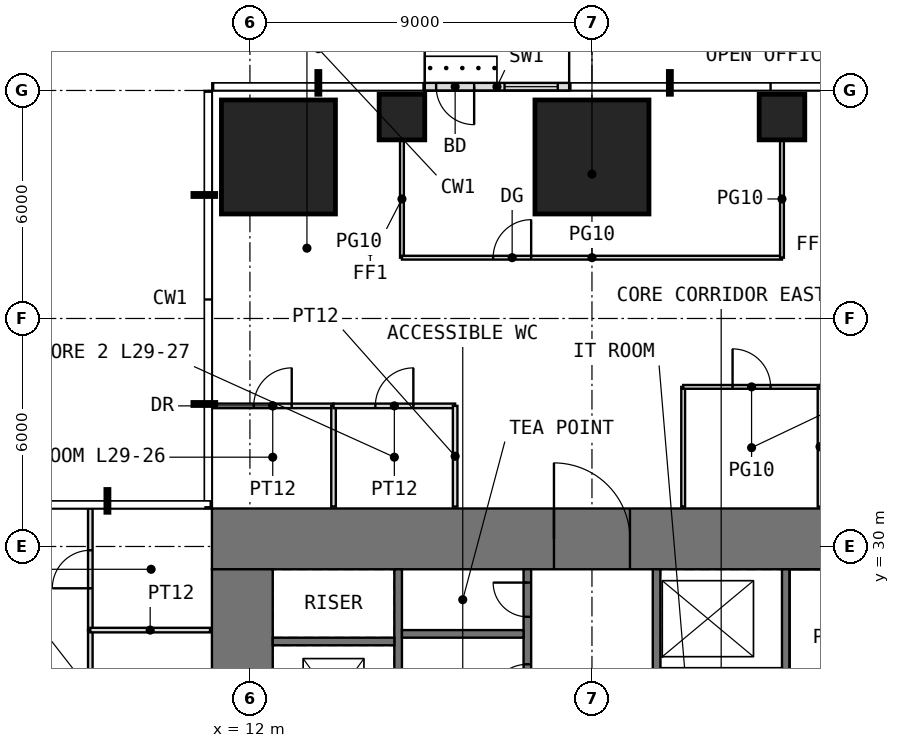
"""IFC4 building model, lengths in metres.
Left out: names, types, materials, properties, quantities, classifications, styles, units other than length and angle.
Written with IfcOpenShell. Run it as: python <this file> out.ifc"""

import sys

from ifc_helpers import new_model, si_unit, direction, frame, frame_2d, origin, origin_2d, place, context, subcontext, project, spatial, rectangle, extrude, element, fill, save


model = new_model("IFC4")
c1 = context("Model", 3, precision=1e-05, world=origin(), true_north=direction((0.0, 1.0)))
c2 = subcontext(c1, "Body", "Model", "MODEL_VIEW")
j1 = project(units=[si_unit("LENGTHUNIT", "METRE"), si_unit("PLANEANGLEUNIT", "RADIAN")], contexts=[c1])
p1 = place(None, origin())
s1 = spatial("IfcSite", under=j1, at=p1, CompositionType="ELEMENT")
p2 = place(p1, origin())
s2 = spatial("IfcBuilding", under=s1, at=p2, CompositionType="ELEMENT")
p3 = place(p2, frame((0.0, 0.0, 124.5)))
s3 = spatial("IfcBuildingStorey", under=s2, at=p3, CompositionType="ELEMENT", Elevation=124.5)
p4 = place(p3, frame((12.75, 40.25, 0.0), z_axis=(0.0, 0.0, 1.0), x_axis=(1.0, 0.0, 0.0)))
e1 = element("IfcColumn", 1, at=p4, inside=s3, PredefinedType="COLUMN", context=c2, shape_type="SweptSolid", body=[
    extrude(rectangle(XDim=3.0, YDim=3.0, at=origin_2d()), origin(), (0.0, 0.0, 1.0), 4.0),
])
p5 = place(p3, frame((16.0, 41.3, 0.0), z_axis=(0.0, 0.0, 1.0), x_axis=(1.0, 0.0, 0.0)))
e2 = element("IfcColumn", 2, at=p5, inside=s3, PredefinedType="COLUMN", context=c2, shape_type="SweptSolid", body=[
    extrude(rectangle(XDim=1.2, YDim=1.2, at=origin_2d()), origin(), (0.0, 0.0, 1.0), 4.0),
])
p6 = place(p3, frame((21.0, 40.25, 0.0), z_axis=(0.0, 0.0, 1.0), x_axis=(1.0, 0.0, 0.0)))
e3 = element("IfcColumn", 3, at=p6, inside=s3, PredefinedType="COLUMN", context=c2, shape_type="SweptSolid", body=[
    extrude(rectangle(XDim=3.0, YDim=3.0, at=origin_2d()), origin(), (0.0, 0.0, 1.0), 4.0),
])
p7 = place(p3, frame((26.0, 41.3, 0.0), z_axis=(0.0, 0.0, 1.0), x_axis=(1.0, 0.0, 0.0)))
e4 = element("IfcColumn", 4, at=p7, inside=s3, PredefinedType="COLUMN", context=c2, shape_type="SweptSolid", body=[
    extrude(rectangle(XDim=1.2, YDim=1.2, at=origin_2d()), origin(), (0.0, 0.0, 1.0), 4.0),
])
p8 = place(p3, frame((20.4, 42.1, 0.0), z_axis=(0.0, 0.0, 1.0), x_axis=(-1.0, 0.0, 0.0)))
e5 = element("IfcWall", 5, at=p8, inside=s3, PredefinedType="USERDEFINED", context=c2, shape_type="SweptSolid", body=[
    extrude(rectangle(XDim=3.8, YDim=0.2, at=frame_2d((1.9, 0.0))), origin(), (0.0, 0.0, 1.0), 3.75),
])
p9 = place(p8, frame((2.5, 0.0, 0.0)))
e6 = element("IfcOpeningElement", 6, at=p9, cuts=e5, PredefinedType="OPENING", context=c2, shape_type="SweptSolid", body=[
    extrude(rectangle(XDim=1.0, YDim=2.4, at=frame_2d((0.5, 1.2))), frame((0.0, 0.11, 0.0), z_axis=(0.0, -1.0, 0.0), x_axis=(1.0, 0.0, 0.0)), (0.0, 0.0, 1.0), 0.22),
])
p10 = place(p8, frame((0.3, 0.0, 0.3)))
e7 = element("IfcOpeningElement", 7, at=p10, cuts=e5, PredefinedType="OPENING", context=c2, shape_type="SweptSolid", body=[
    extrude(rectangle(XDim=1.4, YDim=2.7, at=frame_2d((0.7, 1.35))), frame((0.0, 0.11, 0.0), z_axis=(0.0, -1.0, 0.0), x_axis=(1.0, 0.0, 0.0)), (0.0, 0.0, 1.0), 0.22),
])
p11 = place(p3, frame((11.0, 30.2, -0.05), z_axis=(0.0, 0.0, 1.0), x_axis=(1.0, 0.0, 0.0)))
e8 = element("IfcWall", 8, at=p11, inside=s3, PredefinedType="SHEAR", context=c2, shape_type="SweptSolid", body=[
    extrude(rectangle(XDim=20.0, YDim=1.6, at=frame_2d((10.0, 0.0))), origin(), (0.0, 0.0, 1.0), 4.0),
])
p12 = place(p11, frame((9.0, 0.0, 0.05)))
e9 = element("IfcOpeningElement", 9, at=p12, cuts=e8, PredefinedType="OPENING", context=c2, shape_type="SweptSolid", body=[
    extrude(rectangle(XDim=2.0, YDim=2.2, at=frame_2d((1.0, 1.1))), frame((0.0, 0.81, 0.0), z_axis=(0.0, -1.0, 0.0), x_axis=(1.0, 0.0, 0.0)), (0.0, 0.0, 1.0), 1.62),
])
p13 = place(p3, frame((11.8, 12.6, -0.05), z_axis=(0.0, 0.0, 1.0), x_axis=(0.0, 1.0, 0.0)))
e10 = element("IfcWall", 10, at=p13, inside=s3, PredefinedType="SHEAR", context=c2, shape_type="SweptSolid", body=[
    extrude(rectangle(XDim=16.8, YDim=1.6, at=frame_2d((8.4, 0.0))), origin(), (0.0, 0.0, 1.0), 4.0),
])
p14 = place(p13, frame((9.9, 0.0, 0.05)))
e11 = element("IfcOpeningElement", 11, at=p14, cuts=e10, PredefinedType="OPENING", context=c2, shape_type="SweptSolid", body=[
    extrude(rectangle(XDim=1.0, YDim=2.2, at=frame_2d((0.5, 1.1))), frame((0.0, 0.81, 0.0), z_axis=(0.0, -1.0, 0.0), x_axis=(1.0, 0.0, 0.0)), (0.0, 0.0, 1.0), 1.62),
])
p15 = place(p3, frame((15.9, 12.6, -0.05), z_axis=(0.0, 0.0, 1.0), x_axis=(0.0, 1.0, 0.0)))
e12 = element("IfcWall", 12, at=p15, inside=s3, PredefinedType="SHEAR", context=c2, shape_type="SweptSolid", body=[
    extrude(rectangle(XDim=16.8, YDim=0.2, at=frame_2d((8.4, 0.0))), origin(), (0.0, 0.0, 1.0), 4.0),
])
p16 = place(p15, frame((8.9, 0.0, 0.05)))
e13 = element("IfcOpeningElement", 13, at=p16, cuts=e12, PredefinedType="OPENING", context=c2, shape_type="SweptSolid", body=[
    extrude(rectangle(XDim=1.0, YDim=2.2, at=frame_2d((0.5, 1.1))), frame((0.0, 0.11, 0.0), z_axis=(0.0, -1.0, 0.0), x_axis=(1.0, 0.0, 0.0)), (0.0, 0.0, 1.0), 0.22),
])
p17 = place(p3, frame((19.3, 12.6, -0.05), z_axis=(0.0, 0.0, 1.0), x_axis=(0.0, 1.0, 0.0)))
e14 = element("IfcWall", 14, at=p17, inside=s3, PredefinedType="SHEAR", context=c2, shape_type="SweptSolid", body=[
    extrude(rectangle(XDim=16.8, YDim=0.2, at=frame_2d((8.4, 0.0))), origin(), (0.0, 0.0, 1.0), 4.0),
])
p18 = place(p17, frame((8.7, 0.0, 0.05)))
e15 = element("IfcOpeningElement", 15, at=p18, cuts=e14, PredefinedType="OPENING", context=c2, shape_type="SweptSolid", body=[
    extrude(rectangle(XDim=1.0, YDim=2.2, at=frame_2d((0.5, 1.1))), frame((0.0, 0.11, 0.0), z_axis=(0.0, -1.0, 0.0), x_axis=(1.0, 0.0, 0.0)), (0.0, 0.0, 1.0), 0.22),
])
p19 = place(p17, frame((10.85, 0.0, 0.05)))
e16 = element("IfcOpeningElement", 16, at=p19, cuts=e14, PredefinedType="OPENING", context=c2, shape_type="SweptSolid", body=[
    extrude(rectangle(XDim=0.9, YDim=2.2, at=frame_2d((0.45, 1.1))), frame((0.0, 0.11, 0.0), z_axis=(0.0, -1.0, 0.0), x_axis=(1.0, 0.0, 0.0)), (0.0, 0.0, 1.0), 0.22),
])
p20 = place(p17, frame((13.3, 0.0, 0.05)))
e17 = element("IfcOpeningElement", 17, at=p20, cuts=e14, PredefinedType="OPENING", context=c2, shape_type="SweptSolid", body=[
    extrude(rectangle(XDim=1.0, YDim=2.2, at=frame_2d((0.5, 1.1))), frame((0.0, 0.11, 0.0), z_axis=(0.0, -1.0, 0.0), x_axis=(1.0, 0.0, 0.0)), (0.0, 0.0, 1.0), 0.22),
])
p21 = place(p17, frame((15.55, 0.0, 0.05)))
e18 = element("IfcOpeningElement", 18, at=p21, cuts=e14, PredefinedType="OPENING", context=c2, shape_type="SweptSolid", body=[
    extrude(rectangle(XDim=0.9, YDim=2.2, at=frame_2d((0.45, 1.1))), frame((0.0, 0.11, 0.0), z_axis=(0.0, -1.0, 0.0), x_axis=(1.0, 0.0, 0.0)), (0.0, 0.0, 1.0), 0.22),
])
p22 = place(p17, frame((0.75, 0.0, 0.05)))
e19 = element("IfcOpeningElement", 19, at=p22, cuts=e14, PredefinedType="OPENING", context=c2, shape_type="SweptSolid", body=[
    extrude(rectangle(XDim=1.1, YDim=2.2, at=frame_2d((0.55, 1.1))), frame((0.0, 0.11, 0.0), z_axis=(0.0, -1.0, 0.0), x_axis=(1.0, 0.0, 0.0)), (0.0, 0.0, 1.0), 0.22),
])
p23 = place(p17, frame((3.55, 0.0, 0.05)))
e20 = element("IfcOpeningElement", 20, at=p23, cuts=e14, PredefinedType="OPENING", context=c2, shape_type="SweptSolid", body=[
    extrude(rectangle(XDim=1.1, YDim=2.2, at=frame_2d((0.55, 1.1))), frame((0.0, 0.11, 0.0), z_axis=(0.0, -1.0, 0.0), x_axis=(1.0, 0.0, 0.0)), (0.0, 0.0, 1.0), 0.22),
])
p24 = place(p17, frame((6.35, 0.0, 0.05)))
e21 = element("IfcOpeningElement", 21, at=p24, cuts=e14, PredefinedType="OPENING", context=c2, shape_type="SweptSolid", body=[
    extrude(rectangle(XDim=1.1, YDim=2.2, at=frame_2d((0.55, 1.1))), frame((0.0, 0.11, 0.0), z_axis=(0.0, -1.0, 0.0), x_axis=(1.0, 0.0, 0.0)), (0.0, 0.0, 1.0), 0.22),
])
p25 = place(p3, frame((22.7, 12.6, -0.05), z_axis=(0.0, 0.0, 1.0), x_axis=(0.0, 1.0, 0.0)))
e22 = element("IfcWall", 22, at=p25, inside=s3, PredefinedType="SHEAR", context=c2, shape_type="SweptSolid", body=[
    extrude(rectangle(XDim=16.8, YDim=0.2, at=frame_2d((8.4, 0.0))), origin(), (0.0, 0.0, 1.0), 4.0),
])
p26 = place(p25, frame((0.45, 0.0, 0.05)))
e23 = element("IfcOpeningElement", 23, at=p26, cuts=e22, PredefinedType="OPENING", context=c2, shape_type="SweptSolid", body=[
    extrude(rectangle(XDim=0.9, YDim=2.2, at=frame_2d((0.45, 1.1))), frame((0.0, 0.11, 0.0), z_axis=(0.0, -1.0, 0.0), x_axis=(1.0, 0.0, 0.0)), (0.0, 0.0, 1.0), 0.22),
])
p27 = place(p25, frame((7.1, 0.0, 0.05)))
e24 = element("IfcOpeningElement", 24, at=p27, cuts=e22, PredefinedType="OPENING", context=c2, shape_type="SweptSolid", body=[
    extrude(rectangle(XDim=1.0, YDim=2.2, at=frame_2d((0.5, 1.1))), frame((0.0, 0.11, 0.0), z_axis=(0.0, -1.0, 0.0), x_axis=(1.0, 0.0, 0.0)), (0.0, 0.0, 1.0), 0.22),
])
p28 = place(p25, frame((1.95, 0.0, 0.05)))
e25 = element("IfcOpeningElement", 25, at=p28, cuts=e22, PredefinedType="OPENING", context=c2, shape_type="SweptSolid", body=[
    extrude(rectangle(XDim=0.9, YDim=2.2, at=frame_2d((0.45, 1.1))), frame((0.0, 0.11, 0.0), z_axis=(0.0, -1.0, 0.0), x_axis=(1.0, 0.0, 0.0)), (0.0, 0.0, 1.0), 0.22),
])
p29 = place(p25, frame((4.95, 0.0, 0.05)))
e26 = element("IfcOpeningElement", 26, at=p29, cuts=e22, PredefinedType="OPENING", context=c2, shape_type="SweptSolid", body=[
    extrude(rectangle(XDim=0.9, YDim=2.2, at=frame_2d((0.45, 1.1))), frame((0.0, 0.11, 0.0), z_axis=(0.0, -1.0, 0.0), x_axis=(1.0, 0.0, 0.0)), (0.0, 0.0, 1.0), 0.22),
])
p30 = place(p25, frame((9.4, 0.0, 0.05)))
e27 = element("IfcOpeningElement", 27, at=p30, cuts=e22, PredefinedType="OPENING", context=c2, shape_type="SweptSolid", body=[
    extrude(rectangle(XDim=1.0, YDim=2.2, at=frame_2d((0.5, 1.1))), frame((0.0, 0.11, 0.0), z_axis=(0.0, -1.0, 0.0), x_axis=(1.0, 0.0, 0.0)), (0.0, 0.0, 1.0), 0.22),
])
p31 = place(p3, frame((26.1, 12.6, -0.05), z_axis=(0.0, 0.0, 1.0), x_axis=(0.0, 1.0, 0.0)))
e28 = element("IfcWall", 28, at=p31, inside=s3, PredefinedType="SHEAR", context=c2, shape_type="SweptSolid", body=[
    extrude(rectangle(XDim=16.8, YDim=0.2, at=frame_2d((8.4, 0.0))), origin(), (0.0, 0.0, 1.0), 4.0),
])
p32 = place(p31, frame((6.9, 0.0, 0.05)))
e29 = element("IfcOpeningElement", 29, at=p32, cuts=e28, PredefinedType="OPENING", context=c2, shape_type="SweptSolid", body=[
    extrude(rectangle(XDim=1.0, YDim=2.2, at=frame_2d((0.5, 1.1))), frame((0.0, 0.11, 0.0), z_axis=(0.0, -1.0, 0.0), x_axis=(1.0, 0.0, 0.0)), (0.0, 0.0, 1.0), 0.22),
])
for number, where, z_axis, x_axis in (
    (30, (12.6, 27.5, -0.05), (0.0, 0.0, 1.0), (1.0, 0.0, 0.0)),
    (31, (16.0, 27.7, -0.05), (0.0, 0.0, 1.0), (1.0, 0.0, 0.0)),
):
    element("IfcWall", number, at=place(p3, frame(where, z_axis=z_axis, x_axis=x_axis)), inside=s3, PredefinedType="SHEAR", context=c2, shape_type="SweptSolid", body=[
        extrude(rectangle(XDim=3.2, YDim=0.2, at=frame_2d((1.6, 0.0))), origin(), (0.0, 0.0, 1.0), 4.0),
    ])
p33 = place(p3, frame((7.8, 24.6, 0.0), z_axis=(0.0, 0.0, 1.0), x_axis=(0.0, 1.0, 0.0)))
e32 = element("IfcWall", 32, at=p33, inside=s3, PredefinedType="PARTITIONING", context=c2, shape_type="SweptSolid", body=[
    extrude(rectangle(XDim=3.2, YDim=0.12, at=frame_2d((1.6, 0.0))), origin(), (0.0, 0.0, 1.0), 3.75),
])
p34 = place(p33, frame((1.1, 0.0, 0.0)))
e33 = element("IfcOpeningElement", 33, at=p34, cuts=e32, PredefinedType="OPENING", context=c2, shape_type="SweptSolid", body=[
    extrude(rectangle(XDim=1.0, YDim=2.2, at=frame_2d((0.5, 1.1))), frame((0.0, 0.07, 0.0), z_axis=(0.0, -1.0, 0.0), x_axis=(1.0, 0.0, 0.0)), (0.0, 0.0, 1.0), 0.14),
])
p35 = place(p3, frame((7.8, 27.8, 0.0), z_axis=(0.0, 0.0, 1.0), x_axis=(0.0, 1.0, 0.0)))
e34 = element("IfcWall", 34, at=p35, inside=s3, PredefinedType="PARTITIONING", context=c2, shape_type="SweptSolid", body=[
    extrude(rectangle(XDim=3.2, YDim=0.12, at=frame_2d((1.6, 0.0))), origin(), (0.0, 0.0, 1.0), 3.75),
])
p36 = place(p35, frame((1.1, 0.0, 0.0)))
e35 = element("IfcOpeningElement", 35, at=p36, cuts=e34, PredefinedType="OPENING", context=c2, shape_type="SweptSolid", body=[
    extrude(rectangle(XDim=1.0, YDim=2.2, at=frame_2d((0.5, 1.1))), frame((0.0, 0.07, 0.0), z_axis=(0.0, -1.0, 0.0), x_axis=(1.0, 0.0, 0.0)), (0.0, 0.0, 1.0), 0.14),
])
p37 = place(p3, frame((7.8, 27.8, 0.0), z_axis=(0.0, 0.0, 1.0), x_axis=(1.0, 0.0, 0.0)))
e36 = element("IfcWall", 36, at=p37, inside=s3, PredefinedType="PARTITIONING", context=c2, shape_type="SweptSolid", body=[
    extrude(rectangle(XDim=3.15, YDim=0.12, at=frame_2d((1.575, 0.0))), origin(), (0.0, 0.0, 1.0), 3.75),
])
p38 = place(p3, frame((11.0, 33.7, 0.0), z_axis=(0.0, 0.0, 1.0), x_axis=(1.0, 0.0, 0.0)))
e37 = element("IfcWall", 37, at=p38, inside=s3, PredefinedType="PARTITIONING", context=c2, shape_type="SweptSolid", body=[
    extrude(rectangle(XDim=3.2, YDim=0.12, at=frame_2d((1.6, 0.0))), origin(), (0.0, 0.0, 1.0), 3.75),
])
p39 = place(p38, frame((1.1, 0.0, 0.0)))
e38 = element("IfcOpeningElement", 38, at=p39, cuts=e37, PredefinedType="OPENING", context=c2, shape_type="SweptSolid", body=[
    extrude(rectangle(XDim=1.0, YDim=2.2, at=frame_2d((0.5, 1.1))), frame((0.0, 0.07, 0.0), z_axis=(0.0, -1.0, 0.0), x_axis=(1.0, 0.0, 0.0)), (0.0, 0.0, 1.0), 0.14),
])
p40 = place(p3, frame((14.2, 31.05, 0.0), z_axis=(0.0, 0.0, 1.0), x_axis=(0.0, 1.0, 0.0)))
e39 = element("IfcWall", 39, at=p40, inside=s3, PredefinedType="PARTITIONING", context=c2, shape_type="SweptSolid", body=[
    extrude(rectangle(XDim=2.65, YDim=0.12, at=frame_2d((1.325, 0.0))), origin(), (0.0, 0.0, 1.0), 3.75),
])
p41 = place(p3, frame((14.2, 33.7, 0.0), z_axis=(0.0, 0.0, 1.0), x_axis=(1.0, 0.0, 0.0)))
e40 = element("IfcWall", 40, at=p41, inside=s3, PredefinedType="PARTITIONING", context=c2, shape_type="SweptSolid", body=[
    extrude(rectangle(XDim=3.2, YDim=0.12, at=frame_2d((1.6, 0.0))), origin(), (0.0, 0.0, 1.0), 3.75),
])
p42 = place(p41, frame((1.1, 0.0, 0.0)))
e41 = element("IfcOpeningElement", 41, at=p42, cuts=e40, PredefinedType="OPENING", context=c2, shape_type="SweptSolid", body=[
    extrude(rectangle(XDim=1.0, YDim=2.2, at=frame_2d((0.5, 1.1))), frame((0.0, 0.07, 0.0), z_axis=(0.0, -1.0, 0.0), x_axis=(1.0, 0.0, 0.0)), (0.0, 0.0, 1.0), 0.14),
])
p43 = place(p3, frame((16.0, 37.6, 0.0), z_axis=(0.0, 0.0, 1.0), x_axis=(0.0, 1.0, 0.0)))
e42 = element("IfcWall", 42, at=p43, inside=s3, PredefinedType="PARTITIONING", context=c2, shape_type="SweptSolid", body=[
    extrude(rectangle(XDim=3.09, YDim=0.1, at=frame_2d((1.545, 0.0))), origin(), (0.0, 0.0, 1.0), 3.75),
])
p44 = place(p3, frame((16.0, 37.6, 0.0), z_axis=(0.0, 0.0, 1.0), x_axis=(1.0, 0.0, 0.0)))
e43 = element("IfcWall", 43, at=p44, inside=s3, PredefinedType="PARTITIONING", context=c2, shape_type="SweptSolid", body=[
    extrude(rectangle(XDim=10.0, YDim=0.1, at=frame_2d((5.0, 0.0))), origin(), (0.0, 0.0, 1.0), 3.75),
])
p45 = place(p44, frame((2.4, 0.0, 0.0)))
e44 = element("IfcOpeningElement", 44, at=p45, cuts=e43, PredefinedType="OPENING", context=c2, shape_type="SweptSolid", body=[
    extrude(rectangle(XDim=1.0, YDim=2.4, at=frame_2d((0.5, 1.2))), frame((0.0, 0.06, 0.0), z_axis=(0.0, -1.0, 0.0), x_axis=(1.0, 0.0, 0.0)), (0.0, 0.0, 1.0), 0.12),
])
p46 = place(p3, frame((17.4, 31.05, 0.0), z_axis=(0.0, 0.0, 1.0), x_axis=(0.0, 1.0, 0.0)))
e45 = element("IfcWall", 45, at=p46, inside=s3, PredefinedType="PARTITIONING", context=c2, shape_type="SweptSolid", body=[
    extrude(rectangle(XDim=2.65, YDim=0.12, at=frame_2d((1.325, 0.0))), origin(), (0.0, 0.0, 1.0), 3.75),
])
p47 = place(p3, frame((23.4, 31.05, 0.0), z_axis=(0.0, 0.0, 1.0), x_axis=(0.0, 1.0, 0.0)))
e46 = element("IfcWall", 46, at=p47, inside=s3, PredefinedType="PARTITIONING", context=c2, shape_type="SweptSolid", body=[
    extrude(rectangle(XDim=3.15, YDim=0.1, at=frame_2d((1.575, 0.0))), origin(), (0.0, 0.0, 1.0), 3.75),
])
p48 = place(p3, frame((23.4, 34.2, 0.0), z_axis=(0.0, 0.0, 1.0), x_axis=(1.0, 0.0, 0.0)))
e47 = element("IfcWall", 47, at=p48, inside=s3, PredefinedType="PARTITIONING", context=c2, shape_type="SweptSolid", body=[
    extrude(rectangle(XDim=3.6, YDim=0.1, at=frame_2d((1.8, 0.0))), origin(), (0.0, 0.0, 1.0), 3.75),
])
p49 = place(p48, frame((1.3, 0.0, 0.0)))
e48 = element("IfcOpeningElement", 48, at=p49, cuts=e47, PredefinedType="OPENING", context=c2, shape_type="SweptSolid", body=[
    extrude(rectangle(XDim=1.0, YDim=2.4, at=frame_2d((0.5, 1.2))), frame((0.0, 0.06, 0.0), z_axis=(0.0, -1.0, 0.0), x_axis=(1.0, 0.0, 0.0)), (0.0, 0.0, 1.0), 0.12),
])
p50 = place(p3, frame((26.0, 37.6, 0.0), z_axis=(0.0, 0.0, 1.0), x_axis=(0.0, 1.0, 0.0)))
e49 = element("IfcWall", 49, at=p50, inside=s3, PredefinedType="PARTITIONING", context=c2, shape_type="SweptSolid", body=[
    extrude(rectangle(XDim=3.09, YDim=0.1, at=frame_2d((1.545, 0.0))), origin(), (0.0, 0.0, 1.0), 3.75),
])
p51 = place(p3, frame((27.0, 31.05, 0.0), z_axis=(0.0, 0.0, 1.0), x_axis=(0.0, 1.0, 0.0)))
e50 = element("IfcWall", 50, at=p51, inside=s3, PredefinedType="PARTITIONING", context=c2, shape_type="SweptSolid", body=[
    extrude(rectangle(XDim=3.15, YDim=0.12, at=frame_2d((1.575, 0.0))), origin(), (0.0, 0.0, 1.0), 3.75),
])
p52 = place(p9, origin())
e51 = element("IfcDoor", 51, at=p52, inside=s3, OperationType="SINGLE_SWING_LEFT", PredefinedType="DOOR", context=c2, shape_type="SweptSolid", body=[
    extrude(rectangle(XDim=1.0, YDim=2.4, at=frame_2d((0.5, 1.2))), frame((0.0, 0.025, 0.0), z_axis=(0.0, -1.0, 0.0), x_axis=(1.0, 0.0, 0.0)), (0.0, 0.0, 1.0), 0.05),
])
fill(e6, e51)
p53 = place(p10, origin())
e52 = element("IfcWindow", 52, at=p53, inside=s3, PartitioningType="SINGLE_PANEL", PredefinedType="WINDOW", context=c2, shape_type="SweptSolid", body=[
    extrude(rectangle(XDim=1.4, YDim=2.7, at=frame_2d((0.7, 1.35))), frame((0.0, 0.03, 0.0), z_axis=(0.0, -1.0, 0.0), x_axis=(1.0, 0.0, 0.0)), (0.0, 0.0, 1.0), 0.06),
])
fill(e7, e52)
p54 = place(p12, origin())
e53 = element("IfcDoor", 53, at=p54, inside=s3, OperationType="DOUBLE_DOOR_SINGLE_SWING", PredefinedType="DOOR", context=c2, shape_type="SweptSolid", body=[
    extrude(rectangle(XDim=2.0, YDim=2.2, at=frame_2d((1.0, 1.1))), frame((0.0, 0.025, 0.0), z_axis=(0.0, -1.0, 0.0), x_axis=(1.0, 0.0, 0.0)), (0.0, 0.0, 1.0), 0.05),
])
fill(e9, e53)
p55 = place(p20, origin())
e54 = element("IfcDoor", 54, at=p55, inside=s3, OperationType="SINGLE_SWING_LEFT", PredefinedType="DOOR", context=c2, shape_type="SweptSolid", body=[
    extrude(rectangle(XDim=1.0, YDim=2.2, at=frame_2d((0.5, 1.1))), frame((0.0, 0.025, 0.0), z_axis=(0.0, -1.0, 0.0), x_axis=(1.0, 0.0, 0.0)), (0.0, 0.0, 1.0), 0.05),
])
fill(e17, e54)
p56 = place(p21, origin())
e55 = element("IfcDoor", 55, at=p56, inside=s3, OperationType="SINGLE_SWING_RIGHT", PredefinedType="DOOR", context=c2, shape_type="SweptSolid", body=[
    extrude(rectangle(XDim=0.9, YDim=2.2, at=frame_2d((0.45, 1.1))), frame((0.0, 0.025, 0.0), z_axis=(0.0, -1.0, 0.0), x_axis=(1.0, 0.0, 0.0)), (0.0, 0.0, 1.0), 0.05),
])
fill(e18, e55)
p57 = place(p39, origin())
e56 = element("IfcDoor", 56, at=p57, inside=s3, OperationType="SINGLE_SWING_RIGHT", PredefinedType="DOOR", context=c2, shape_type="SweptSolid", body=[
    extrude(rectangle(XDim=1.0, YDim=2.2, at=frame_2d((0.5, 1.1))), frame((0.0, 0.025, 0.0), z_axis=(0.0, -1.0, 0.0), x_axis=(1.0, 0.0, 0.0)), (0.0, 0.0, 1.0), 0.05),
])
fill(e38, e56)
p58 = place(p42, origin())
e57 = element("IfcDoor", 57, at=p58, inside=s3, OperationType="SINGLE_SWING_RIGHT", PredefinedType="DOOR", context=c2, shape_type="SweptSolid", body=[
    extrude(rectangle(XDim=1.0, YDim=2.2, at=frame_2d((0.5, 1.1))), frame((0.0, 0.025, 0.0), z_axis=(0.0, -1.0, 0.0), x_axis=(1.0, 0.0, 0.0)), (0.0, 0.0, 1.0), 0.05),
])
fill(e41, e57)
p59 = place(p49, origin())
e58 = element("IfcDoor", 58, at=p59, inside=s3, OperationType="SINGLE_SWING_LEFT", PredefinedType="DOOR", context=c2, shape_type="SweptSolid", body=[
    extrude(rectangle(XDim=1.0, YDim=2.4, at=frame_2d((0.5, 1.2))), frame((0.0, 0.025, 0.0), z_axis=(0.0, -1.0, 0.0), x_axis=(1.0, 0.0, 0.0)), (0.0, 0.0, 1.0), 0.05),
])
fill(e48, e58)
p60 = place(p45, origin())
e59 = element("IfcDoor", 59, at=p60, inside=s3, OperationType="SINGLE_SWING_RIGHT", PredefinedType="DOOR", context=c2, shape_type="SweptSolid", body=[
    extrude(rectangle(XDim=1.0, YDim=2.4, at=frame_2d((0.5, 1.2))), frame((0.0, 0.025, 0.0), z_axis=(0.0, -1.0, 0.0), x_axis=(1.0, 0.0, 0.0)), (0.0, 0.0, 1.0), 0.05),
])
fill(e44, e59)
p61 = place(p36, origin())
e60 = element("IfcDoor", 60, at=p61, inside=s3, OperationType="SINGLE_SWING_LEFT", PredefinedType="DOOR", context=c2, shape_type="SweptSolid", body=[
    extrude(rectangle(XDim=1.0, YDim=2.2, at=frame_2d((0.5, 1.1))), frame((0.0, 0.025, 0.0), z_axis=(0.0, -1.0, 0.0), x_axis=(1.0, 0.0, 0.0)), (0.0, 0.0, 1.0), 0.05),
])
fill(e35, e60)
save(model, sys.argv[1])
